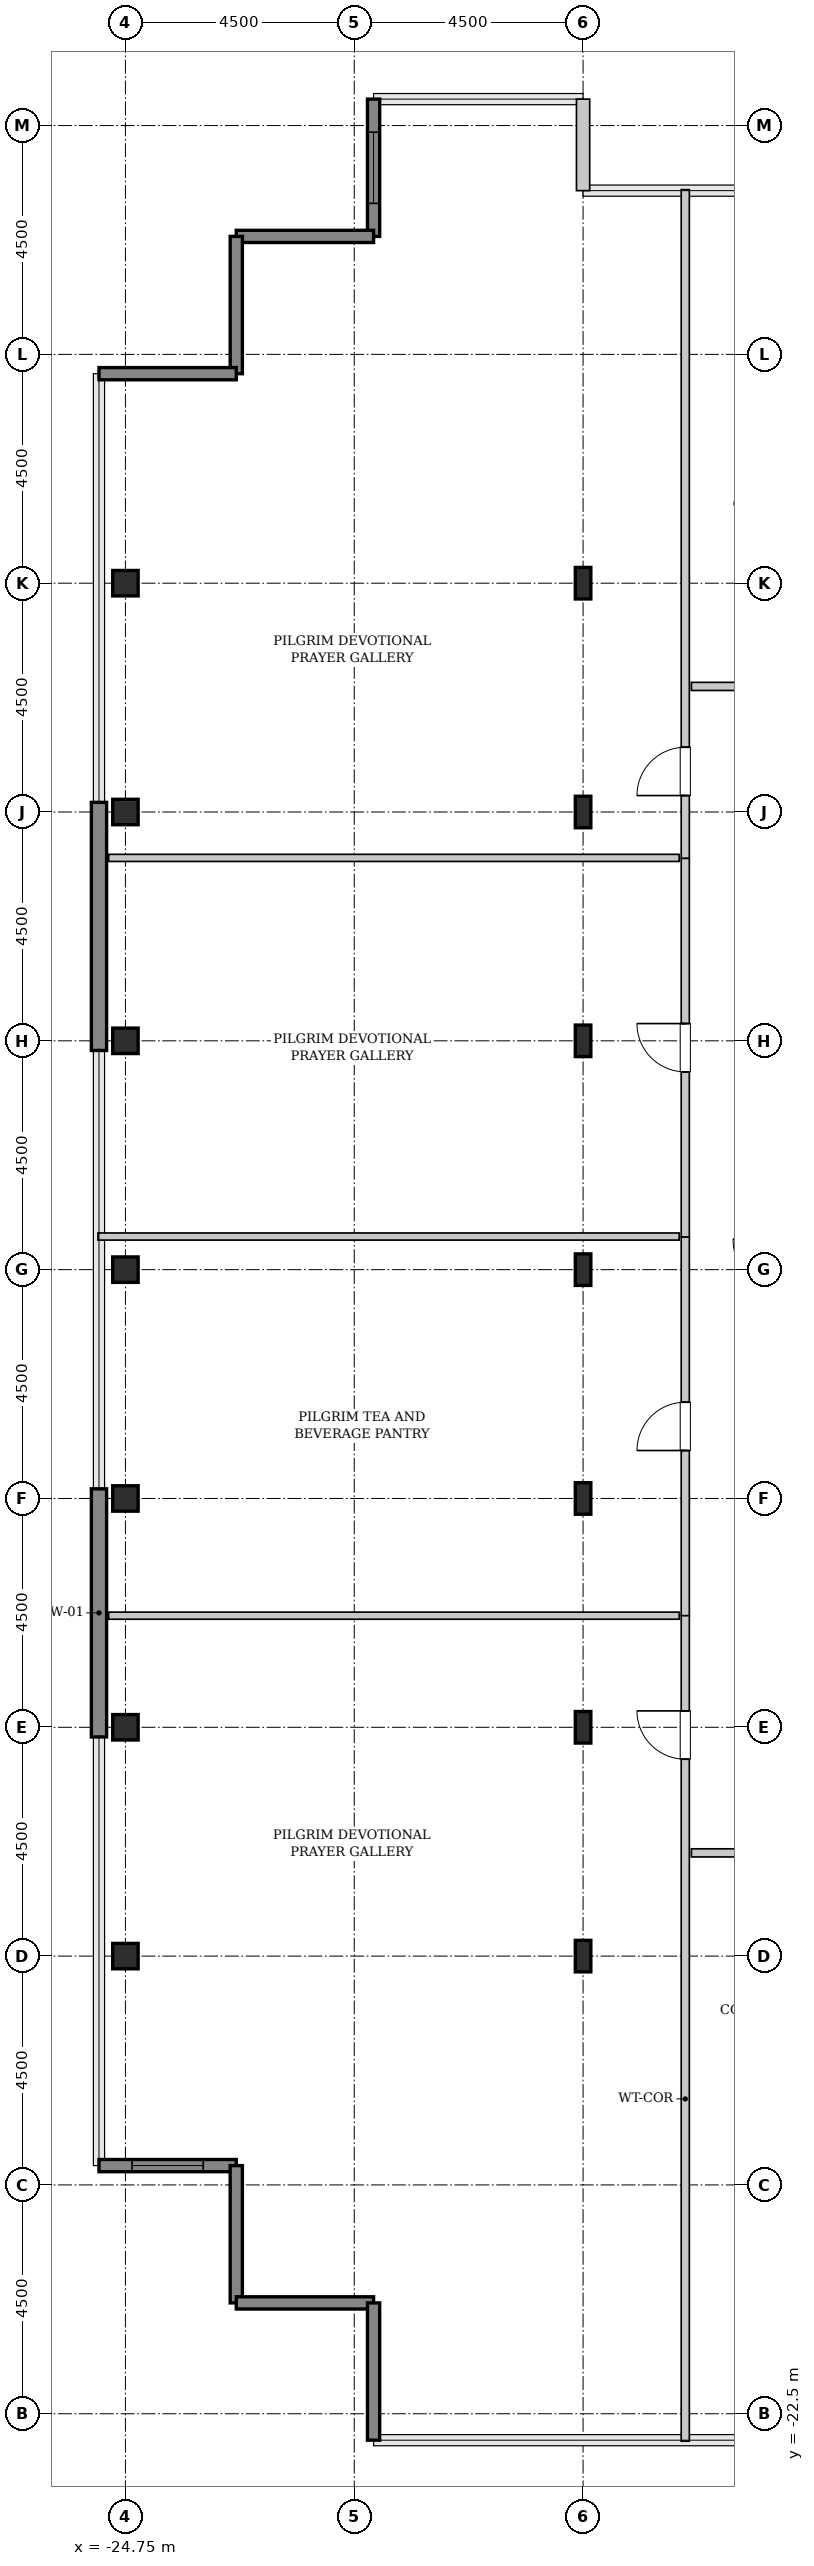
"""IFC4 building model, lengths in metres.
Left out: names, types, materials, properties, quantities, classifications, styles, units other than length and angle.
Written with IfcOpenShell. Run it as: python <this file> out.ifc"""

import sys

from ifc_helpers import new_model, si_unit, direction, frame, frame_2d, origin, origin_2d, place, context, subcontext, project, spatial, rectangle, hollow_rectangle, i_section, extrude, source, transform, mapped, element, fill, save


model = new_model("IFC4")
c1 = context("Model", 3, precision=1e-05, world=origin(), true_north=direction((0.0, 1.0)))
c2 = subcontext(c1, "Body", "Model", "MODEL_VIEW")
j1 = project(units=[si_unit("LENGTHUNIT", "METRE"), si_unit("PLANEANGLEUNIT", "RADIAN")], contexts=[c1])
p1 = place(None, origin())
s1 = spatial("IfcSite", under=j1, at=p1, CompositionType="ELEMENT")
p2 = place(p1, origin())
s2 = spatial("IfcBuilding", under=s1, at=p2, CompositionType="ELEMENT")
p3 = place(p2, frame((0.0, 0.0, 310.2)))
s3 = spatial("IfcBuildingStorey", under=s2, at=p3, CompositionType="ELEMENT", Elevation=310.2)
m1 = source(origin(), c2, "Body", "SweptSolid", [
    extrude(hollow_rectangle(XDim=0.5, YDim=0.5, WallThickness=0.025, InnerFilletRadius=0.025, OuterFilletRadius=0.05, at=origin_2d()), origin(), (0.0, 0.0, 1.0), 3.8),
])
for number, where, z_axis, x_axis in (
    (1, (-24.75, -13.5, 0.0), (0.0, 0.0, 1.0), (1.0, 0.0, 0.0)),
    (2, (-24.75, -9.0, 0.0), (0.0, 0.0, 1.0), (1.0, 0.0, 0.0)),
    (3, (-24.75, -4.5, 0.0), (0.0, 0.0, 1.0), (1.0, 0.0, 0.0)),
    (4, (-24.75, 0.0, 0.0), (0.0, 0.0, 1.0), (1.0, 0.0, 0.0)),
    (5, (-24.75, 4.5, 0.0), (0.0, 0.0, 1.0), (1.0, 0.0, 0.0)),
    (6, (-24.75, 9.0, 0.0), (0.0, 0.0, 1.0), (1.0, 0.0, 0.0)),
    (7, (-24.75, 13.5, 0.0), (0.0, 0.0, 1.0), (1.0, 0.0, 0.0)),
):
    element("IfcColumn", number, at=place(p3, frame(where, z_axis=z_axis, x_axis=x_axis)), inside=s3, PredefinedType="COLUMN", context=c2, shape_type="MappedRepresentation", body=[
        mapped(m1, transform((0.0, 0.0, 0.0), x_axis=(1.0, 0.0, 0.0), y_axis=(0.0, 1.0, 0.0), z_axis=(0.0, 0.0, 1.0), scale=1.0)),
    ])
m2 = source(origin(), c2, "Body", "SweptSolid", [
    extrude(i_section(OverallWidth=0.305, OverallDepth=0.62, WebThickness=0.021, FlangeThickness=0.04, FilletRadius=0.027, at=origin_2d()), origin(), (0.0, 0.0, 1.0), 3.8),
])
for number, where, z_axis, x_axis in (
    (8, (-15.75, -13.5, 0.0), (0.0, 0.0, 1.0), (1.0, 0.0, 0.0)),
    (9, (-15.75, -9.0, 0.0), (0.0, 0.0, 1.0), (1.0, 0.0, 0.0)),
    (10, (-15.75, -4.5, 0.0), (0.0, 0.0, 1.0), (1.0, 0.0, 0.0)),
    (11, (-15.75, 0.0, 0.0), (0.0, 0.0, 1.0), (1.0, 0.0, 0.0)),
    (12, (-15.75, 4.5, 0.0), (0.0, 0.0, 1.0), (1.0, 0.0, 0.0)),
    (13, (-15.75, 9.0, 0.0), (0.0, 0.0, 1.0), (1.0, 0.0, 0.0)),
    (14, (-15.75, 13.5, 0.0), (0.0, 0.0, 1.0), (1.0, 0.0, 0.0)),
):
    element("IfcColumn", number, at=place(p3, frame(where, z_axis=z_axis, x_axis=x_axis)), inside=s3, PredefinedType="COLUMN", context=c2, shape_type="MappedRepresentation", body=[
        mapped(m2, transform((0.0, 0.0, 0.0), x_axis=(1.0, 0.0, 0.0), y_axis=(0.0, 1.0, 0.0), z_axis=(0.0, 0.0, 1.0), scale=1.0)),
    ])
m3 = source(origin(), c2, "Body", "SweptSolid", [
    extrude(rectangle(XDim=4.88, YDim=0.3, at=frame_2d((2.44, 0.0))), origin(), (0.0, 0.0, 1.0), 3.55),
])
for number, where, z_axis, x_axis in (
    (15, (-25.27, -9.19, 0.0), (0.0, 0.0, 1.0), (0.0, 1.0, 0.0)),
    (16, (-25.27, 4.31, 0.0), (0.0, 0.0, 1.0), (0.0, 1.0, 0.0)),
):
    element("IfcWall", number, at=place(p3, frame(where, z_axis=z_axis, x_axis=x_axis)), inside=s3, PredefinedType="SHEAR", context=c2, shape_type="MappedRepresentation", body=[
        mapped(m3, transform((0.0, 0.0, 0.0), x_axis=(1.0, 0.0, 0.0), y_axis=(0.0, 1.0, 0.0), z_axis=(0.0, 0.0, 1.0), scale=1.0)),
    ])
m4 = source(origin(), c2, "Body", "SweptSolid", [
    extrude(rectangle(XDim=1.8, YDim=0.26, at=frame_2d((0.9, 0.0))), origin(), (0.0, 0.0, 1.0), 3.55),
])
p4 = place(p3, frame((-15.75, 21.22, 0.0), z_axis=(0.0, 0.0, 1.0), x_axis=(0.0, 1.0, 0.0)))
e17 = element("IfcWall", 17, at=p4, inside=s3, PredefinedType="SOLIDWALL", context=c2, shape_type="MappedRepresentation", body=[
    mapped(m4, transform((0.0, 0.0, 0.0), x_axis=(1.0, 0.0, 0.0), y_axis=(0.0, 1.0, 0.0), z_axis=(0.0, 0.0, 1.0), scale=1.0)),
])
m5 = source(origin(), c2, "Body", "SweptSolid", [
    extrude(rectangle(XDim=2.7, YDim=0.24, at=frame_2d((1.35, 0.0))), origin(), (0.0, 0.0, 1.0), 3.55),
])
p5 = place(p3, frame((-19.87, 23.02, 0.0), z_axis=(0.0, 0.0, 1.0), x_axis=(0.0, -1.0, 0.0)))
e18 = element("IfcWall", 18, at=p5, inside=s3, PredefinedType="SHEAR", context=c2, shape_type="MappedRepresentation", body=[
    mapped(m5, transform((0.0, 0.0, 0.0), x_axis=(1.0, 0.0, 0.0), y_axis=(0.0, 1.0, 0.0), z_axis=(0.0, 0.0, 1.0), scale=1.0)),
])
p6 = place(p5, frame((0.65, 0.0, 0.85)))
e19 = element("IfcOpeningElement", 19, at=p6, cuts=e18, PredefinedType="OPENING", context=c2, shape_type="SweptSolid", body=[
    extrude(rectangle(XDim=1.4, YDim=1.8, at=frame_2d((0.7, 0.9))), frame((0.0, 0.13, 0.0), z_axis=(0.0, -1.0, 0.0), x_axis=(1.0, 0.0, 0.0)), (0.0, 0.0, 1.0), 0.26),
])
for number, where, z_axis, x_axis in (
    (20, (-19.87, 20.32, 0.0), (0.0, 0.0, 1.0), (-1.0, 0.0, 0.0)),
    (21, (-22.57, 20.32, 0.0), (0.0, 0.0, 1.0), (0.0, -1.0, 0.0)),
    (22, (-22.57, 17.62, 0.0), (0.0, 0.0, 1.0), (-1.0, 0.0, 0.0)),
):
    element("IfcWall", number, at=place(p3, frame(where, z_axis=z_axis, x_axis=x_axis)), inside=s3, PredefinedType="SHEAR", context=c2, shape_type="MappedRepresentation", body=[
        mapped(m5, transform((0.0, 0.0, 0.0), x_axis=(1.0, 0.0, 0.0), y_axis=(0.0, 1.0, 0.0), z_axis=(0.0, 0.0, 1.0), scale=1.0)),
    ])
p7 = place(p3, frame((-25.27, -17.62, 0.0), z_axis=(0.0, 0.0, 1.0), x_axis=(1.0, 0.0, 0.0)))
e23 = element("IfcWall", 23, at=p7, inside=s3, PredefinedType="SHEAR", context=c2, shape_type="MappedRepresentation", body=[
    mapped(m5, transform((0.0, 0.0, 0.0), x_axis=(1.0, 0.0, 0.0), y_axis=(0.0, 1.0, 0.0), z_axis=(0.0, 0.0, 1.0), scale=1.0)),
])
p8 = place(p7, frame((0.65, 0.0, 0.85)))
e24 = element("IfcOpeningElement", 24, at=p8, cuts=e23, PredefinedType="OPENING", context=c2, shape_type="SweptSolid", body=[
    extrude(rectangle(XDim=1.4, YDim=1.8, at=frame_2d((0.7, 0.9))), frame((0.0, 0.13, 0.0), z_axis=(0.0, -1.0, 0.0), x_axis=(1.0, 0.0, 0.0)), (0.0, 0.0, 1.0), 0.26),
])
for number, where, z_axis, x_axis in (
    (25, (-22.57, -17.62, 0.0), (0.0, 0.0, 1.0), (0.0, -1.0, 0.0)),
    (26, (-22.57, -20.32, 0.0), (0.0, 0.0, 1.0), (1.0, 0.0, 0.0)),
    (27, (-19.87, -20.32, 0.0), (0.0, 0.0, 1.0), (0.0, -1.0, 0.0)),
):
    element("IfcWall", number, at=place(p3, frame(where, z_axis=z_axis, x_axis=x_axis)), inside=s3, PredefinedType="SHEAR", context=c2, shape_type="MappedRepresentation", body=[
        mapped(m5, transform((0.0, 0.0, 0.0), x_axis=(1.0, 0.0, 0.0), y_axis=(0.0, 1.0, 0.0), z_axis=(0.0, 0.0, 1.0), scale=1.0)),
    ])
m6 = source(origin(), c2, "Body", "SweptSolid", [
    extrude(rectangle(XDim=16.245, YDim=0.16, at=frame_2d((8.123, 0.0))), origin(), (0.0, 0.0, 1.0), 3.535),
])
p9 = place(p3, frame((-13.74, -23.04, 0.0), z_axis=(0.0, 0.0, 1.0), x_axis=(0.0, 1.0, 0.0)))
e28 = element("IfcWall", 28, at=p9, inside=s3, PredefinedType="PARTITIONING", context=c2, shape_type="MappedRepresentation", body=[
    mapped(m6, transform((0.0, 0.0, 0.0), x_axis=(1.0, 0.0, 0.0), y_axis=(0.0, 1.0, 0.0), z_axis=(0.0, 0.0, 1.0), scale=1.0)),
])
p10 = place(p9, frame((13.413, 0.0, 0.0)))
e29 = element("IfcOpeningElement", 29, at=p10, cuts=e28, PredefinedType="OPENING", context=c2, shape_type="SweptSolid", body=[
    extrude(rectangle(XDim=0.95, YDim=2.1, at=frame_2d((0.475, 1.05))), frame((0.0, 0.09, 0.0), z_axis=(0.0, -1.0, 0.0), x_axis=(1.0, 0.0, 0.0)), (0.0, 0.0, 1.0), 0.18),
])
m7 = source(origin(), c2, "Body", "SweptSolid", [
    extrude(rectangle(XDim=11.22, YDim=0.14, at=frame_2d((5.61, 0.0))), origin(), (0.0, 0.0, 1.0), 3.535),
])
p11 = place(p3, frame((-25.08, -6.805, 0.0), z_axis=(0.0, 0.0, 1.0), x_axis=(1.0, 0.0, 0.0)))
e30 = element("IfcWall", 30, at=p11, inside=s3, PredefinedType="PARTITIONING", context=c2, shape_type="MappedRepresentation", body=[
    mapped(m7, transform((0.0, 0.0, 0.0), x_axis=(1.0, 0.0, 0.0), y_axis=(0.0, 1.0, 0.0), z_axis=(0.0, 0.0, 1.0), scale=1.0)),
])
m8 = source(origin(), c2, "Body", "SweptSolid", [
    extrude(rectangle(XDim=13.153, YDim=0.16, at=frame_2d((6.576, 0.0))), origin(), (0.0, 0.0, 1.0), 3.535),
])
p12 = place(p3, frame((-13.74, 8.087, 0.0), z_axis=(0.0, 0.0, 1.0), x_axis=(0.0, 1.0, 0.0)))
e31 = element("IfcWall", 31, at=p12, inside=s3, PredefinedType="PARTITIONING", context=c2, shape_type="MappedRepresentation", body=[
    mapped(m8, transform((0.0, 0.0, 0.0), x_axis=(1.0, 0.0, 0.0), y_axis=(0.0, 1.0, 0.0), z_axis=(0.0, 0.0, 1.0), scale=1.0)),
])
p13 = place(p12, frame((1.236, 0.0, 0.0)))
e32 = element("IfcOpeningElement", 32, at=p13, cuts=e31, PredefinedType="OPENING", context=c2, shape_type="SweptSolid", body=[
    extrude(rectangle(XDim=0.95, YDim=2.1, at=frame_2d((0.475, 1.05))), frame((0.0, 0.09, 0.0), z_axis=(0.0, -1.0, 0.0), x_axis=(1.0, 0.0, 0.0)), (0.0, 0.0, 1.0), 0.18),
])
p14 = place(p3, frame((-25.08, 8.097, 0.0), z_axis=(0.0, 0.0, 1.0), x_axis=(1.0, 0.0, 0.0)))
e33 = element("IfcWall", 33, at=p14, inside=s3, PredefinedType="PARTITIONING", context=c2, shape_type="MappedRepresentation", body=[
    mapped(m7, transform((0.0, 0.0, 0.0), x_axis=(1.0, 0.0, 0.0), y_axis=(0.0, 1.0, 0.0), z_axis=(0.0, 0.0, 1.0), scale=1.0)),
])
m9 = source(origin(), c2, "Body", "SweptSolid", [
    extrude(rectangle(XDim=7.446, YDim=0.16, at=frame_2d((3.723, 0.0))), origin(), (0.0, 0.0, 1.0), 3.535),
])
p15 = place(p3, frame((-13.74, 0.641, 0.0), z_axis=(0.0, 0.0, 1.0), x_axis=(0.0, 1.0, 0.0)))
e34 = element("IfcWall", 34, at=p15, inside=s3, PredefinedType="PARTITIONING", context=c2, shape_type="MappedRepresentation", body=[
    mapped(m9, transform((0.0, 0.0, 0.0), x_axis=(1.0, 0.0, 0.0), y_axis=(0.0, 1.0, 0.0), z_axis=(0.0, 0.0, 1.0), scale=1.0)),
])
p16 = place(p15, frame((3.248, 0.0, 0.0)))
e35 = element("IfcOpeningElement", 35, at=p16, cuts=e34, PredefinedType="OPENING", context=c2, shape_type="SweptSolid", body=[
    extrude(rectangle(XDim=0.95, YDim=2.1, at=frame_2d((0.475, 1.05))), frame((0.0, 0.09, 0.0), z_axis=(0.0, -1.0, 0.0), x_axis=(1.0, 0.0, 0.0)), (0.0, 0.0, 1.0), 0.18),
])
m10 = source(origin(), c2, "Body", "SweptSolid", [
    extrude(rectangle(XDim=11.43, YDim=0.14, at=frame_2d((5.715, 0.0))), origin(), (0.0, 0.0, 1.0), 3.535),
])
p17 = place(p3, frame((-25.29, 0.651, 0.0), z_axis=(0.0, 0.0, 1.0), x_axis=(1.0, 0.0, 0.0)))
e36 = element("IfcWall", 36, at=p17, inside=s3, PredefinedType="PARTITIONING", context=c2, shape_type="MappedRepresentation", body=[
    mapped(m10, transform((0.0, 0.0, 0.0), x_axis=(1.0, 0.0, 0.0), y_axis=(0.0, 1.0, 0.0), z_axis=(0.0, 0.0, 1.0), scale=1.0)),
])
m11 = source(origin(), c2, "Body", "SweptSolid", [
    extrude(rectangle(XDim=7.446, YDim=0.16, at=frame_2d((3.723, 0.0))), origin(), (0.0, 0.0, 1.0), 3.535),
])
p18 = place(p3, frame((-13.74, -6.805, 0.0), z_axis=(0.0, 0.0, 1.0), x_axis=(0.0, 1.0, 0.0)))
e37 = element("IfcWall", 37, at=p18, inside=s3, PredefinedType="PARTITIONING", context=c2, shape_type="MappedRepresentation", body=[
    mapped(m11, transform((0.0, 0.0, 0.0), x_axis=(1.0, 0.0, 0.0), y_axis=(0.0, 1.0, 0.0), z_axis=(0.0, 0.0, 1.0), scale=1.0)),
])
p19 = place(p18, frame((3.248, 0.0, 0.0)))
e38 = element("IfcOpeningElement", 38, at=p19, cuts=e37, PredefinedType="OPENING", context=c2, shape_type="SweptSolid", body=[
    extrude(rectangle(XDim=0.95, YDim=2.1, at=frame_2d((0.475, 1.05))), frame((0.0, 0.09, 0.0), z_axis=(0.0, -1.0, 0.0), x_axis=(1.0, 0.0, 0.0)), (0.0, 0.0, 1.0), 0.18),
])
m12 = source(origin(), c2, "Body", "SweptSolid", [
    extrude(rectangle(XDim=4.125, YDim=0.16, at=frame_2d((2.062, 0.0))), origin(), (0.0, 0.0, 1.0), 3.535),
])
p20 = place(p3, frame((-13.62, 11.47, 0.0), z_axis=(0.0, 0.0, 1.0), x_axis=(1.0, 0.0, 0.0)))
e39 = element("IfcWall", 39, at=p20, inside=s3, PredefinedType="PARTITIONING", context=c2, shape_type="MappedRepresentation", body=[
    mapped(m12, transform((0.0, 0.0, 0.0), x_axis=(1.0, 0.0, 0.0), y_axis=(0.0, 1.0, 0.0), z_axis=(0.0, 0.0, 1.0), scale=1.0)),
])
p21 = place(p20, frame((1.587, 0.0, 0.0)))
e40 = element("IfcOpeningElement", 40, at=p21, cuts=e39, PredefinedType="OPENING", context=c2, shape_type="SweptSolid", body=[
    extrude(rectangle(XDim=0.95, YDim=2.1, at=frame_2d((0.475, 1.05))), frame((0.0, 0.09, 0.0), z_axis=(0.0, -1.0, 0.0), x_axis=(1.0, 0.0, 0.0)), (0.0, 0.0, 1.0), 0.18),
])
m13 = source(origin(), c2, "Body", "SweptSolid", [
    extrude(rectangle(XDim=3.625, YDim=0.16, at=frame_2d((1.812, 0.0))), origin(), (0.0, 0.0, 1.0), 3.535),
])
p22 = place(p3, frame((-13.62, -11.47, 0.0), z_axis=(0.0, 0.0, 1.0), x_axis=(1.0, 0.0, 0.0)))
e41 = element("IfcWall", 41, at=p22, inside=s3, PredefinedType="PARTITIONING", context=c2, shape_type="MappedRepresentation", body=[
    mapped(m13, transform((0.0, 0.0, 0.0), x_axis=(1.0, 0.0, 0.0), y_axis=(0.0, 1.0, 0.0), z_axis=(0.0, 0.0, 1.0), scale=1.0)),
])
p23 = place(p22, frame((1.337, 0.0, 0.0)))
e42 = element("IfcOpeningElement", 42, at=p23, cuts=e41, PredefinedType="OPENING", context=c2, shape_type="SweptSolid", body=[
    extrude(rectangle(XDim=0.95, YDim=2.1, at=frame_2d((0.475, 1.05))), frame((0.0, 0.09, 0.0), z_axis=(0.0, -1.0, 0.0), x_axis=(1.0, 0.0, 0.0)), (0.0, 0.0, 1.0), 0.18),
])
m14 = source(origin(), c2, "Body", "SweptSolid", [
    extrude(rectangle(XDim=1.4, YDim=1.8, at=frame_2d((0.7, 0.9))), frame((0.0, 0.03, 0.0), z_axis=(0.0, -1.0, 0.0), x_axis=(1.0, 0.0, 0.0)), (0.0, 0.0, 1.0), 0.06),
])
p24 = place(p6, origin())
e43 = element("IfcWindow", 43, at=p24, inside=s3, PartitioningType="SINGLE_PANEL", PredefinedType="WINDOW", context=c2, shape_type="MappedRepresentation", body=[
    mapped(m14, transform((0.0, 0.0, 0.0), x_axis=(1.0, 0.0, 0.0), y_axis=(0.0, 1.0, 0.0), z_axis=(0.0, 0.0, 1.0), scale=1.0)),
])
fill(e19, e43)
p25 = place(p8, origin())
e44 = element("IfcWindow", 44, at=p25, inside=s3, PartitioningType="SINGLE_PANEL", PredefinedType="WINDOW", context=c2, shape_type="MappedRepresentation", body=[
    mapped(m14, transform((0.0, 0.0, 0.0), x_axis=(1.0, 0.0, 0.0), y_axis=(0.0, 1.0, 0.0), z_axis=(0.0, 0.0, 1.0), scale=1.0)),
])
fill(e24, e44)
m15 = source(origin(), c2, "Body", "SweptSolid", [
    extrude(rectangle(XDim=0.95, YDim=2.1, at=frame_2d((0.475, 1.05))), frame((0.0, 0.025, 0.0), z_axis=(0.0, -1.0, 0.0), x_axis=(1.0, 0.0, 0.0)), (0.0, 0.0, 1.0), 0.05),
])
p26 = place(p10, origin())
e45 = element("IfcDoor", 45, at=p26, inside=s3, OperationType="SINGLE_SWING_RIGHT", PredefinedType="DOOR", context=c2, shape_type="MappedRepresentation", body=[
    mapped(m15, transform((0.0, 0.0, 0.0), x_axis=(1.0, 0.0, 0.0), y_axis=(0.0, 1.0, 0.0), z_axis=(0.0, 0.0, 1.0), scale=1.0)),
])
fill(e29, e45)
p27 = place(p13, origin())
e46 = element("IfcDoor", 46, at=p27, inside=s3, OperationType="SINGLE_SWING_LEFT", PredefinedType="DOOR", context=c2, shape_type="MappedRepresentation", body=[
    mapped(m15, transform((0.0, 0.0, 0.0), x_axis=(1.0, 0.0, 0.0), y_axis=(0.0, 1.0, 0.0), z_axis=(0.0, 0.0, 1.0), scale=1.0)),
])
fill(e32, e46)
p28 = place(p16, origin())
e47 = element("IfcDoor", 47, at=p28, inside=s3, OperationType="SINGLE_SWING_RIGHT", PredefinedType="DOOR", context=c2, shape_type="MappedRepresentation", body=[
    mapped(m15, transform((0.0, 0.0, 0.0), x_axis=(1.0, 0.0, 0.0), y_axis=(0.0, 1.0, 0.0), z_axis=(0.0, 0.0, 1.0), scale=1.0)),
])
fill(e35, e47)
p29 = place(p19, origin())
e48 = element("IfcDoor", 48, at=p29, inside=s3, OperationType="SINGLE_SWING_LEFT", PredefinedType="DOOR", context=c2, shape_type="MappedRepresentation", body=[
    mapped(m15, transform((0.0, 0.0, 0.0), x_axis=(1.0, 0.0, 0.0), y_axis=(0.0, 1.0, 0.0), z_axis=(0.0, 0.0, 1.0), scale=1.0)),
])
fill(e38, e48)
save(model, sys.argv[1])
